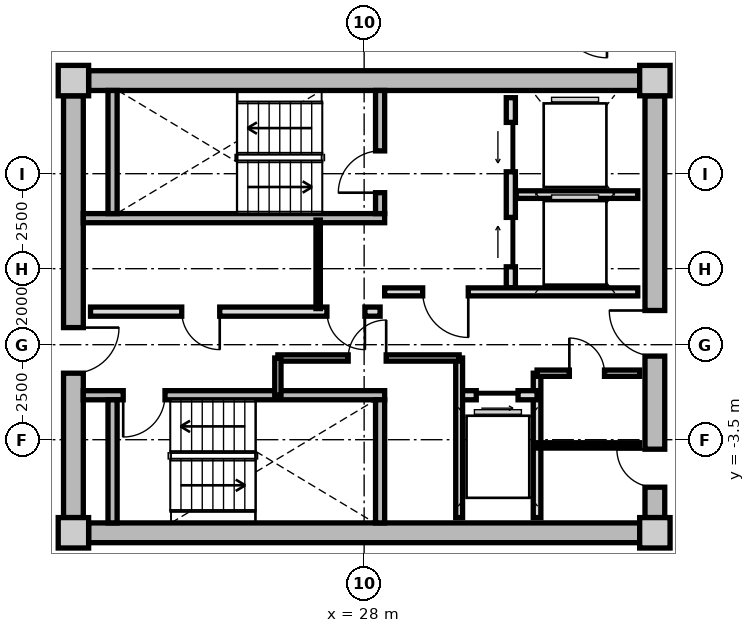
"""IFC4 building model, lengths in metres.
Left out: names, types, materials, properties, quantities, classifications, styles, units other than length and angle.
Written with IfcOpenShell. Run it as: python <this file> out.ifc"""

import sys

from ifc_helpers import new_model, si_unit, direction, frame, frame_2d, origin, origin_2d, place, context, subcontext, project, spatial, rectangle, extrude, source, transform, mapped, element, fill, save


model = new_model("IFC4")
c1 = context("Model", 3, precision=1e-05, world=origin(), true_north=direction((0.0, 1.0)))
c2 = subcontext(c1, "Body", "Model", "MODEL_VIEW")
j1 = project(units=[si_unit("LENGTHUNIT", "METRE"), si_unit("PLANEANGLEUNIT", "RADIAN")], contexts=[c1])
p1 = place(None, origin())
s1 = spatial("IfcSite", under=j1, at=p1, CompositionType="ELEMENT")
p2 = place(p1, origin())
s2 = spatial("IfcBuilding", under=s1, at=p2, CompositionType="ELEMENT")
p3 = place(p2, frame((0.0, 0.0, 190.65)))
s3 = spatial("IfcBuildingStorey", under=s2, at=p3, CompositionType="ELEMENT", Elevation=190.65)
m1 = source(origin(), c2, "Body", "SweptSolid", [
    extrude(rectangle(XDim=0.8, YDim=0.8, at=origin_2d()), origin(), (0.0, 0.0, 1.0), 3.05),
])
for number, where, z_axis, x_axis in (
    (1, (20.35, -5.95, 0.0), (0.0, 0.0, 1.0), (1.0, 0.0, 0.0)),
    (2, (35.65, -5.95, 0.0), (0.0, 0.0, 1.0), (1.0, 0.0, 0.0)),
    (3, (35.65, 5.95, 0.0), (0.0, 0.0, 1.0), (1.0, 0.0, 0.0)),
    (4, (20.35, 5.95, 0.0), (0.0, 0.0, 1.0), (1.0, 0.0, 0.0)),
):
    element("IfcColumn", number, at=place(p3, frame(where, z_axis=z_axis, x_axis=x_axis)), inside=s3, PredefinedType="COLUMN", context=c2, shape_type="MappedRepresentation", body=[
        mapped(m1, transform((0.0, 0.0, 0.0), x_axis=(1.0, 0.0, 0.0), y_axis=(0.0, 1.0, 0.0), z_axis=(0.0, 0.0, 1.0), scale=1.0)),
    ])
m2 = source(origin(), c2, "Body", "SweptSolid", [
    extrude(rectangle(XDim=14.5, YDim=0.52, at=frame_2d((7.25, 0.0))), origin(), (0.0, 0.0, 1.0), 2.81),
])
for number, where, z_axis, x_axis in (
    (5, (20.75, 5.95, 0.0), (0.0, 0.0, 1.0), (1.0, 0.0, 0.0)),
    (6, (35.25, -5.95, 0.0), (0.0, 0.0, 1.0), (-1.0, 0.0, 0.0)),
):
    element("IfcWall", number, at=place(p3, frame(where, z_axis=z_axis, x_axis=x_axis)), inside=s3, PredefinedType="SHEAR", context=c2, shape_type="MappedRepresentation", body=[
        mapped(m2, transform((0.0, 0.0, 0.0), x_axis=(1.0, 0.0, 0.0), y_axis=(0.0, 1.0, 0.0), z_axis=(0.0, 0.0, 1.0), scale=1.0)),
    ])
m3 = source(origin(), c2, "Body", "SweptSolid", [
    extrude(rectangle(XDim=11.1, YDim=0.52, at=frame_2d((5.55, 0.0))), origin(), (0.0, 0.0, 1.0), 2.81),
])
p4 = place(p3, frame((20.35, -5.55, 0.0), z_axis=(0.0, 0.0, 1.0), x_axis=(0.0, 1.0, 0.0)))
e7 = element("IfcWall", 7, at=p4, inside=s3, PredefinedType="SHEAR", context=c2, shape_type="MappedRepresentation", body=[
    mapped(m3, transform((0.0, 0.0, 0.0), x_axis=(1.0, 0.0, 0.0), y_axis=(0.0, 1.0, 0.0), z_axis=(0.0, 0.0, 1.0), scale=1.0)),
])
p5 = place(p4, frame((3.8, 0.0, 0.0)))
e8 = element("IfcOpeningElement", 8, at=p5, cuts=e7, PredefinedType="OPENING", context=c2, shape_type="SweptSolid", body=[
    extrude(rectangle(XDim=1.2, YDim=2.15, at=frame_2d((0.6, 1.075))), frame((0.0, 0.27, 0.0), z_axis=(0.0, -1.0, 0.0), x_axis=(1.0, 0.0, 0.0)), (0.0, 0.0, 1.0), 0.54),
])
p6 = place(p3, frame((35.65, 5.55, 0.0), z_axis=(0.0, 0.0, 1.0), x_axis=(0.0, -1.0, 0.0)))
e9 = element("IfcWall", 9, at=p6, inside=s3, PredefinedType="SHEAR", context=c2, shape_type="MappedRepresentation", body=[
    mapped(m3, transform((0.0, 0.0, 0.0), x_axis=(1.0, 0.0, 0.0), y_axis=(0.0, 1.0, 0.0), z_axis=(0.0, 0.0, 1.0), scale=1.0)),
])
p7 = place(p6, frame((5.65, 0.0, 0.0)))
e10 = element("IfcOpeningElement", 10, at=p7, cuts=e9, PredefinedType="OPENING", context=c2, shape_type="SweptSolid", body=[
    extrude(rectangle(XDim=1.2, YDim=2.15, at=frame_2d((0.6, 1.075))), frame((0.0, 0.27, 0.0), z_axis=(0.0, -1.0, 0.0), x_axis=(1.0, 0.0, 0.0)), (0.0, 0.0, 1.0), 0.54),
])
p8 = place(p6, frame((9.3, 0.0, 0.0)))
e11 = element("IfcOpeningElement", 11, at=p8, cuts=e9, PredefinedType="OPENING", context=c2, shape_type="SweptSolid", body=[
    extrude(rectangle(XDim=1.0, YDim=2.1, at=frame_2d((0.5, 1.05))), frame((0.0, 0.27, 0.0), z_axis=(0.0, -1.0, 0.0), x_axis=(1.0, 0.0, 0.0)), (0.0, 0.0, 1.0), 0.54),
])
m4 = source(origin(), c2, "Body", "SweptSolid", [
    extrude(rectangle(XDim=7.93, YDim=0.24, at=frame_2d((3.965, 0.0))), origin(), (0.0, 0.0, 1.0), 2.81),
])
p9 = place(p3, frame((20.61, 2.33, 0.0), z_axis=(0.0, 0.0, 1.0), x_axis=(1.0, 0.0, 0.0)))
e12 = element("IfcWall", 12, at=p9, inside=s3, PredefinedType="PARTITIONING", context=c2, shape_type="MappedRepresentation", body=[
    mapped(m4, transform((0.0, 0.0, 0.0), x_axis=(1.0, 0.0, 0.0), y_axis=(0.0, 1.0, 0.0), z_axis=(0.0, 0.0, 1.0), scale=1.0)),
])
m5 = source(origin(), c2, "Body", "SweptSolid", [
    extrude(rectangle(XDim=3.24, YDim=0.24, at=frame_2d((1.62, 0.0))), origin(), (0.0, 0.0, 1.0), 2.81),
])
p10 = place(p3, frame((21.38, 2.45, 0.0), z_axis=(0.0, 0.0, 1.0), x_axis=(0.0, 1.0, 0.0)))
e13 = element("IfcWall", 13, at=p10, inside=s3, PredefinedType="PARTITIONING", context=c2, shape_type="MappedRepresentation", body=[
    mapped(m5, transform((0.0, 0.0, 0.0), x_axis=(1.0, 0.0, 0.0), y_axis=(0.0, 1.0, 0.0), z_axis=(0.0, 0.0, 1.0), scale=1.0)),
])
p11 = place(p3, frame((28.42, 2.45, 0.0), z_axis=(0.0, 0.0, 1.0), x_axis=(0.0, 1.0, 0.0)))
e14 = element("IfcWall", 14, at=p11, inside=s3, PredefinedType="PARTITIONING", context=c2, shape_type="MappedRepresentation", body=[
    mapped(m5, transform((0.0, 0.0, 0.0), x_axis=(1.0, 0.0, 0.0), y_axis=(0.0, 1.0, 0.0), z_axis=(0.0, 0.0, 1.0), scale=1.0)),
])
p12 = place(p11, frame((0.55, 0.0, 0.0)))
e15 = element("IfcOpeningElement", 15, at=p12, cuts=e14, PredefinedType="OPENING", context=c2, shape_type="SweptSolid", body=[
    extrude(rectangle(XDim=1.1, YDim=2.15, at=frame_2d((0.55, 1.075))), frame((0.0, 0.13, 0.0), z_axis=(0.0, -1.0, 0.0), x_axis=(1.0, 0.0, 0.0)), (0.0, 0.0, 1.0), 0.26),
])
p13 = place(p3, frame((20.61, -2.33, 0.0), z_axis=(0.0, 0.0, 1.0), x_axis=(1.0, 0.0, 0.0)))
e16 = element("IfcWall", 16, at=p13, inside=s3, PredefinedType="PARTITIONING", context=c2, shape_type="MappedRepresentation", body=[
    mapped(m4, transform((0.0, 0.0, 0.0), x_axis=(1.0, 0.0, 0.0), y_axis=(0.0, 1.0, 0.0), z_axis=(0.0, 0.0, 1.0), scale=1.0)),
])
p14 = place(p13, frame((1.05, 0.0, 0.0)))
e17 = element("IfcOpeningElement", 17, at=p14, cuts=e16, PredefinedType="OPENING", context=c2, shape_type="SweptSolid", body=[
    extrude(rectangle(XDim=1.1, YDim=2.15, at=frame_2d((0.55, 1.075))), frame((0.0, 0.13, 0.0), z_axis=(0.0, -1.0, 0.0), x_axis=(1.0, 0.0, 0.0)), (0.0, 0.0, 1.0), 0.26),
])
for number, where, z_axis, x_axis in (
    (18, (21.38, -5.69, 0.0), (0.0, 0.0, 1.0), (0.0, 1.0, 0.0)),
    (19, (28.42, -5.69, 0.0), (0.0, 0.0, 1.0), (0.0, 1.0, 0.0)),
):
    element("IfcWall", number, at=place(p3, frame(where, z_axis=z_axis, x_axis=x_axis)), inside=s3, PredefinedType="PARTITIONING", context=c2, shape_type="MappedRepresentation", body=[
        mapped(m5, transform((0.0, 0.0, 0.0), x_axis=(1.0, 0.0, 0.0), y_axis=(0.0, 1.0, 0.0), z_axis=(0.0, 0.0, 1.0), scale=1.0)),
    ])
m6 = source(origin(), c2, "Body", "SweptSolid", [
    extrude(rectangle(XDim=5.0, YDim=0.24, at=frame_2d((2.5, 0.0))), origin(), (0.0, 0.0, 1.0), 2.795),
])
p15 = place(p3, frame((31.86, 0.5, 0.0), z_axis=(0.0, 0.0, 1.0), x_axis=(0.0, 1.0, 0.0)))
e20 = element("IfcWall", 20, at=p15, inside=s3, PredefinedType="PARTITIONING", context=c2, shape_type="MappedRepresentation", body=[
    mapped(m6, transform((0.0, 0.0, 0.0), x_axis=(1.0, 0.0, 0.0), y_axis=(0.0, 1.0, 0.0), z_axis=(0.0, 0.0, 1.0), scale=1.0)),
])
p16 = place(p15, frame((3.05, 0.0, 0.0)))
e21 = element("IfcOpeningElement", 21, at=p16, cuts=e20, PredefinedType="OPENING", context=c2, shape_type="SweptSolid", body=[
    extrude(rectangle(XDim=1.3, YDim=2.2, at=frame_2d((0.65, 1.1))), frame((0.0, 0.13, 0.0), z_axis=(0.0, -1.0, 0.0), x_axis=(1.0, 0.0, 0.0)), (0.0, 0.0, 1.0), 0.26),
])
p17 = place(p15, frame((0.55, 0.0, 0.0)))
e22 = element("IfcOpeningElement", 22, at=p17, cuts=e20, PredefinedType="OPENING", context=c2, shape_type="SweptSolid", body=[
    extrude(rectangle(XDim=1.3, YDim=2.2, at=frame_2d((0.65, 1.1))), frame((0.0, 0.13, 0.0), z_axis=(0.0, -1.0, 0.0), x_axis=(1.0, 0.0, 0.0)), (0.0, 0.0, 1.0), 0.26),
])
m7 = source(origin(), c2, "Body", "SweptSolid", [
    extrude(rectangle(XDim=3.2, YDim=0.2, at=frame_2d((1.6, 0.0))), origin(), (0.0, 0.0, 1.0), 2.795),
])
p18 = place(p3, frame((32.0, 2.95, 0.0), z_axis=(0.0, 0.0, 1.0), x_axis=(1.0, 0.0, 0.0)))
e23 = element("IfcWall", 23, at=p18, inside=s3, PredefinedType="PARTITIONING", context=c2, shape_type="MappedRepresentation", body=[
    mapped(m7, transform((0.0, 0.0, 0.0), x_axis=(1.0, 0.0, 0.0), y_axis=(0.0, 1.0, 0.0), z_axis=(0.0, 0.0, 1.0), scale=1.0)),
])
m8 = source(origin(), c2, "Body", "SweptSolid", [
    extrude(rectangle(XDim=6.66, YDim=0.21, at=frame_2d((3.33, 0.0))), origin(), (0.0, 0.0, 1.0), 2.795),
])
p19 = place(p3, frame((28.54, 0.39, 0.0), z_axis=(0.0, 0.0, 1.0), x_axis=(1.0, 0.0, 0.0)))
e24 = element("IfcWall", 24, at=p19, inside=s3, PredefinedType="PARTITIONING", context=c2, shape_type="MappedRepresentation", body=[
    mapped(m8, transform((0.0, 0.0, 0.0), x_axis=(1.0, 0.0, 0.0), y_axis=(0.0, 1.0, 0.0), z_axis=(0.0, 0.0, 1.0), scale=1.0)),
])
p20 = place(p19, frame((1.0, 0.0, 0.0)))
e25 = element("IfcOpeningElement", 25, at=p20, cuts=e24, PredefinedType="OPENING", context=c2, shape_type="SweptSolid", body=[
    extrude(rectangle(XDim=1.2, YDim=2.15, at=frame_2d((0.6, 1.075))), frame((0.0, 0.115, 0.0), z_axis=(0.0, -1.0, 0.0), x_axis=(1.0, 0.0, 0.0)), (0.0, 0.0, 1.0), 0.23),
])
m9 = source(origin(), c2, "Body", "SweptSolid", [
    extrude(rectangle(XDim=7.62, YDim=0.24, at=frame_2d((3.81, 0.0))), origin(), (0.0, 0.0, 1.0), 2.795),
])
p21 = place(p3, frame((20.8, -0.13, 0.0), z_axis=(0.0, 0.0, 1.0), x_axis=(1.0, 0.0, 0.0)))
e26 = element("IfcWall", 26, at=p21, inside=s3, PredefinedType="PARTITIONING", context=c2, shape_type="MappedRepresentation", body=[
    mapped(m9, transform((0.0, 0.0, 0.0), x_axis=(1.0, 0.0, 0.0), y_axis=(0.0, 1.0, 0.0), z_axis=(0.0, 0.0, 1.0), scale=1.0)),
])
p22 = place(p21, frame((6.22, 0.0, 0.0)))
e27 = element("IfcOpeningElement", 27, at=p22, cuts=e26, PredefinedType="OPENING", context=c2, shape_type="SweptSolid", body=[
    extrude(rectangle(XDim=1.0, YDim=2.1, at=frame_2d((0.5, 1.05))), frame((0.0, 0.13, 0.0), z_axis=(0.0, -1.0, 0.0), x_axis=(1.0, 0.0, 0.0)), (0.0, 0.0, 1.0), 0.26),
])
p23 = place(p21, frame((2.4, 0.0, 0.0)))
e28 = element("IfcOpeningElement", 28, at=p23, cuts=e26, PredefinedType="OPENING", context=c2, shape_type="SweptSolid", body=[
    extrude(rectangle(XDim=1.0, YDim=2.1, at=frame_2d((0.5, 1.05))), frame((0.0, 0.13, 0.0), z_axis=(0.0, -1.0, 0.0), x_axis=(1.0, 0.0, 0.0)), (0.0, 0.0, 1.0), 0.26),
])
m10 = source(origin(), c2, "Body", "SweptSolid", [
    extrude(rectangle(XDim=2.33, YDim=0.115, at=frame_2d((1.165, 0.0))), origin(), (0.0, 0.0, 1.0), 2.795),
])
p24 = place(p3, frame((26.79, -0.05, 0.0), z_axis=(0.0, 0.0, 1.0), x_axis=(0.0, 1.0, 0.0)))
e29 = element("IfcWall", 29, at=p24, inside=s3, PredefinedType="PARTITIONING", context=c2, shape_type="MappedRepresentation", body=[
    mapped(m10, transform((0.0, 0.0, 0.0), x_axis=(1.0, 0.0, 0.0), y_axis=(0.0, 1.0, 0.0), z_axis=(0.0, 0.0, 1.0), scale=1.0)),
])
m11 = source(origin(), c2, "Body", "SweptSolid", [
    extrude(rectangle(XDim=3.8, YDim=0.2, at=frame_2d((1.9, 0.0))), origin(), (0.0, 0.0, 1.0), 2.795),
])
p25 = place(p3, frame((32.55, -5.55, 0.0), z_axis=(0.0, 0.0, 1.0), x_axis=(0.0, 1.0, 0.0)))
e30 = element("IfcWall", 30, at=p25, inside=s3, PredefinedType="PARTITIONING", context=c2, shape_type="MappedRepresentation", body=[
    mapped(m11, transform((0.0, 0.0, 0.0), x_axis=(1.0, 0.0, 0.0), y_axis=(0.0, 1.0, 0.0), z_axis=(0.0, 0.0, 1.0), scale=1.0)),
])
m12 = source(origin(), c2, "Body", "SweptSolid", [
    extrude(rectangle(XDim=2.05, YDim=0.24, at=frame_2d((1.025, 0.0))), origin(), (0.0, 0.0, 1.0), 2.795),
])
p26 = place(p3, frame((30.5, -2.33, 0.0), z_axis=(0.0, 0.0, 1.0), x_axis=(1.0, 0.0, 0.0)))
e31 = element("IfcWall", 31, at=p26, inside=s3, PredefinedType="PARTITIONING", context=c2, shape_type="MappedRepresentation", body=[
    mapped(m12, transform((0.0, 0.0, 0.0), x_axis=(1.0, 0.0, 0.0), y_axis=(0.0, 1.0, 0.0), z_axis=(0.0, 0.0, 1.0), scale=1.0)),
])
p27 = place(p26, frame((0.45, 0.0, 0.0)))
e32 = element("IfcOpeningElement", 32, at=p27, cuts=e31, PredefinedType="OPENING", context=c2, shape_type="SweptSolid", body=[
    extrude(rectangle(XDim=1.1, YDim=2.2, at=frame_2d((0.55, 1.1))), frame((0.0, 0.13, 0.0), z_axis=(0.0, -1.0, 0.0), x_axis=(1.0, 0.0, 0.0)), (0.0, 0.0, 1.0), 0.26),
])
m13 = source(origin(), c2, "Body", "SweptSolid", [
    extrude(rectangle(XDim=4.2, YDim=0.18, at=frame_2d((2.1, 0.0))), origin(), (0.0, 0.0, 1.0), 2.795),
])
p28 = place(p3, frame((30.5, -5.55, 0.0), z_axis=(0.0, 0.0, 1.0), x_axis=(0.0, 1.0, 0.0)))
e33 = element("IfcWall", 33, at=p28, inside=s3, PredefinedType="PARTITIONING", context=c2, shape_type="MappedRepresentation", body=[
    mapped(m13, transform((0.0, 0.0, 0.0), x_axis=(1.0, 0.0, 0.0), y_axis=(0.0, 1.0, 0.0), z_axis=(0.0, 0.0, 1.0), scale=1.0)),
])
m14 = source(origin(), c2, "Body", "SweptSolid", [
    extrude(rectangle(XDim=4.77, YDim=0.165, at=frame_2d((2.385, 0.0))), origin(), (0.0, 0.0, 1.0), 2.795),
])
p29 = place(p3, frame((25.73, -1.35, 0.0), z_axis=(0.0, 0.0, 1.0), x_axis=(1.0, 0.0, 0.0)))
e34 = element("IfcWall", 34, at=p29, inside=s3, PredefinedType="PARTITIONING", context=c2, shape_type="MappedRepresentation", body=[
    mapped(m14, transform((0.0, 0.0, 0.0), x_axis=(1.0, 0.0, 0.0), y_axis=(0.0, 1.0, 0.0), z_axis=(0.0, 0.0, 1.0), scale=1.0)),
])
p30 = place(p29, frame((1.85, 0.0, 0.0)))
e35 = element("IfcOpeningElement", 35, at=p30, cuts=e34, PredefinedType="OPENING", context=c2, shape_type="SweptSolid", body=[
    extrude(rectangle(XDim=1.0, YDim=2.1, at=frame_2d((0.5, 1.05))), frame((0.0, 0.093, 0.0), z_axis=(0.0, -1.0, 0.0), x_axis=(1.0, 0.0, 0.0)), (0.0, 0.0, 1.0), 0.185),
])
m15 = source(origin(), c2, "Body", "SweptSolid", [
    extrude(rectangle(XDim=0.98, YDim=0.165, at=frame_2d((0.49, 0.0))), origin(), (0.0, 0.0, 1.0), 2.795),
])
p31 = place(p3, frame((25.73, -2.33, 0.0), z_axis=(0.0, 0.0, 1.0), x_axis=(0.0, 1.0, 0.0)))
e36 = element("IfcWall", 36, at=p31, inside=s3, PredefinedType="PARTITIONING", context=c2, shape_type="MappedRepresentation", body=[
    mapped(m15, transform((0.0, 0.0, 0.0), x_axis=(1.0, 0.0, 0.0), y_axis=(0.0, 1.0, 0.0), z_axis=(0.0, 0.0, 1.0), scale=1.0)),
])
m16 = source(origin(), c2, "Body", "SweptSolid", [
    extrude(rectangle(XDim=2.7, YDim=0.165, at=frame_2d((1.35, 0.0))), origin(), (0.0, 0.0, 1.0), 2.795),
])
p32 = place(p3, frame((32.55, -1.75, 0.0), z_axis=(0.0, 0.0, 1.0), x_axis=(1.0, 0.0, 0.0)))
e37 = element("IfcWall", 37, at=p32, inside=s3, PredefinedType="PARTITIONING", context=c2, shape_type="MappedRepresentation", body=[
    mapped(m16, transform((0.0, 0.0, 0.0), x_axis=(1.0, 0.0, 0.0), y_axis=(0.0, 1.0, 0.0), z_axis=(0.0, 0.0, 1.0), scale=1.0)),
])
p33 = place(p32, frame((0.85, 0.0, 0.0)))
e38 = element("IfcOpeningElement", 38, at=p33, cuts=e37, PredefinedType="OPENING", context=c2, shape_type="SweptSolid", body=[
    extrude(rectangle(XDim=0.925, YDim=2.1, at=frame_2d((0.462, 1.05))), frame((0.0, 0.093, 0.0), z_axis=(0.0, -1.0, 0.0), x_axis=(1.0, 0.0, 0.0)), (0.0, 0.0, 1.0), 0.185),
])
m17 = source(origin(), c2, "Body", "SweptSolid", [
    extrude(rectangle(XDim=2.7, YDim=0.14, at=frame_2d((1.35, 0.0))), origin(), (0.0, 0.0, 1.0), 2.795),
])
p34 = place(p3, frame((32.55, -3.65, 0.0), z_axis=(0.0, 0.0, 1.0), x_axis=(1.0, 0.0, 0.0)))
e39 = element("IfcWall", 39, at=p34, inside=s3, PredefinedType="PARTITIONING", context=c2, shape_type="MappedRepresentation", body=[
    mapped(m17, transform((0.0, 0.0, 0.0), x_axis=(1.0, 0.0, 0.0), y_axis=(0.0, 1.0, 0.0), z_axis=(0.0, 0.0, 1.0), scale=1.0)),
])
m18 = source(origin(), c2, "Body", "SweptSolid", [
    extrude(rectangle(XDim=1.1, YDim=2.15, at=frame_2d((0.55, 1.075))), frame((0.0, 0.025, 0.0), z_axis=(0.0, -1.0, 0.0), x_axis=(1.0, 0.0, 0.0)), (0.0, 0.0, 1.0), 0.05),
])
p35 = place(p12, origin())
e40 = element("IfcDoor", 40, at=p35, inside=s3, OperationType="SINGLE_SWING_LEFT", PredefinedType="DOOR", context=c2, shape_type="MappedRepresentation", body=[
    mapped(m18, transform((0.0, 0.0, 0.0), x_axis=(1.0, 0.0, 0.0), y_axis=(0.0, 1.0, 0.0), z_axis=(0.0, 0.0, 1.0), scale=1.0)),
])
fill(e15, e40)
p36 = place(p14, frame((1.1, 0.0, 0.0), z_axis=(0.0, 0.0, 1.0), x_axis=(-1.0, 0.0, 0.0)))
e41 = element("IfcDoor", 41, at=p36, inside=s3, OperationType="SINGLE_SWING_RIGHT", PredefinedType="DOOR", context=c2, shape_type="MappedRepresentation", body=[
    mapped(m18, transform((0.0, 0.0, 0.0), x_axis=(1.0, 0.0, 0.0), y_axis=(0.0, 1.0, 0.0), z_axis=(0.0, 0.0, 1.0), scale=1.0)),
])
fill(e17, e41)
m19 = source(origin(), c2, "Body", "SweptSolid", [
    extrude(rectangle(XDim=1.3, YDim=2.2, at=frame_2d((0.65, 1.1))), frame((0.0, 0.025, 0.0), z_axis=(0.0, -1.0, 0.0), x_axis=(1.0, 0.0, 0.0)), (0.0, 0.0, 1.0), 0.05),
])
p37 = place(p16, origin())
e42 = element("IfcDoor", 42, at=p37, inside=s3, OperationType="SLIDING_TO_LEFT", PredefinedType="DOOR", context=c2, shape_type="MappedRepresentation", body=[
    mapped(m19, transform((0.0, 0.0, 0.0), x_axis=(1.0, 0.0, 0.0), y_axis=(0.0, 1.0, 0.0), z_axis=(0.0, 0.0, 1.0), scale=1.0)),
])
fill(e21, e42)
p38 = place(p17, origin())
e43 = element("IfcDoor", 43, at=p38, inside=s3, OperationType="SLIDING_TO_RIGHT", PredefinedType="DOOR", context=c2, shape_type="MappedRepresentation", body=[
    mapped(m19, transform((0.0, 0.0, 0.0), x_axis=(1.0, 0.0, 0.0), y_axis=(0.0, 1.0, 0.0), z_axis=(0.0, 0.0, 1.0), scale=1.0)),
])
fill(e22, e43)
m20 = source(origin(), c2, "Body", "SweptSolid", [
    extrude(rectangle(XDim=1.2, YDim=2.15, at=frame_2d((0.6, 1.075))), frame((0.0, 0.025, 0.0), z_axis=(0.0, -1.0, 0.0), x_axis=(1.0, 0.0, 0.0)), (0.0, 0.0, 1.0), 0.05),
])
p39 = place(p20, frame((1.2, 0.0, 0.0), z_axis=(0.0, 0.0, 1.0), x_axis=(-1.0, 0.0, 0.0)))
e44 = element("IfcDoor", 44, at=p39, inside=s3, OperationType="SINGLE_SWING_LEFT", PredefinedType="DOOR", context=c2, shape_type="MappedRepresentation", body=[
    mapped(m20, transform((0.0, 0.0, 0.0), x_axis=(1.0, 0.0, 0.0), y_axis=(0.0, 1.0, 0.0), z_axis=(0.0, 0.0, 1.0), scale=1.0)),
])
fill(e25, e44)
p40 = place(p5, frame((1.2, 0.0, 0.0), z_axis=(0.0, 0.0, 1.0), x_axis=(-1.0, 0.0, 0.0)))
e45 = element("IfcDoor", 45, at=p40, inside=s3, OperationType="SINGLE_SWING_LEFT", PredefinedType="DOOR", context=c2, shape_type="MappedRepresentation", body=[
    mapped(m20, transform((0.0, 0.0, 0.0), x_axis=(1.0, 0.0, 0.0), y_axis=(0.0, 1.0, 0.0), z_axis=(0.0, 0.0, 1.0), scale=1.0)),
])
fill(e8, e45)
p41 = place(p7, frame((1.2, 0.0, 0.0), z_axis=(0.0, 0.0, 1.0), x_axis=(-1.0, 0.0, 0.0)))
e46 = element("IfcDoor", 46, at=p41, inside=s3, OperationType="SINGLE_SWING_RIGHT", PredefinedType="DOOR", context=c2, shape_type="MappedRepresentation", body=[
    mapped(m20, transform((0.0, 0.0, 0.0), x_axis=(1.0, 0.0, 0.0), y_axis=(0.0, 1.0, 0.0), z_axis=(0.0, 0.0, 1.0), scale=1.0)),
])
fill(e10, e46)
m21 = source(origin(), c2, "Body", "SweptSolid", [
    extrude(rectangle(XDim=1.0, YDim=2.1, at=frame_2d((0.5, 1.05))), frame((0.0, 0.025, 0.0), z_axis=(0.0, -1.0, 0.0), x_axis=(1.0, 0.0, 0.0)), (0.0, 0.0, 1.0), 0.05),
])
p42 = place(p22, frame((1.0, 0.0, 0.0), z_axis=(0.0, 0.0, 1.0), x_axis=(-1.0, 0.0, 0.0)))
e47 = element("IfcDoor", 47, at=p42, inside=s3, OperationType="SINGLE_SWING_LEFT", PredefinedType="DOOR", context=c2, shape_type="MappedRepresentation", body=[
    mapped(m21, transform((0.0, 0.0, 0.0), x_axis=(1.0, 0.0, 0.0), y_axis=(0.0, 1.0, 0.0), z_axis=(0.0, 0.0, 1.0), scale=1.0)),
])
fill(e27, e47)
p43 = place(p23, frame((1.0, 0.0, 0.0), z_axis=(0.0, 0.0, 1.0), x_axis=(-1.0, 0.0, 0.0)))
e48 = element("IfcDoor", 48, at=p43, inside=s3, OperationType="SINGLE_SWING_LEFT", PredefinedType="DOOR", context=c2, shape_type="MappedRepresentation", body=[
    mapped(m21, transform((0.0, 0.0, 0.0), x_axis=(1.0, 0.0, 0.0), y_axis=(0.0, 1.0, 0.0), z_axis=(0.0, 0.0, 1.0), scale=1.0)),
])
fill(e28, e48)
m22 = source(origin(), c2, "Body", "SweptSolid", [
    extrude(rectangle(XDim=1.1, YDim=2.2, at=frame_2d((0.55, 1.1))), frame((0.0, 0.025, 0.0), z_axis=(0.0, -1.0, 0.0), x_axis=(1.0, 0.0, 0.0)), (0.0, 0.0, 1.0), 0.05),
])
p44 = place(p27, frame((1.1, 0.0, 0.0), z_axis=(0.0, 0.0, 1.0), x_axis=(-1.0, 0.0, 0.0)))
e49 = element("IfcDoor", 49, at=p44, inside=s3, OperationType="SLIDING_TO_RIGHT", PredefinedType="DOOR", context=c2, shape_type="MappedRepresentation", body=[
    mapped(m22, transform((0.0, 0.0, 0.0), x_axis=(1.0, 0.0, 0.0), y_axis=(0.0, 1.0, 0.0), z_axis=(0.0, 0.0, 1.0), scale=1.0)),
])
fill(e32, e49)
p45 = place(p30, origin())
e50 = element("IfcDoor", 50, at=p45, inside=s3, OperationType="SINGLE_SWING_RIGHT", PredefinedType="DOOR", context=c2, shape_type="MappedRepresentation", body=[
    mapped(m21, transform((0.0, 0.0, 0.0), x_axis=(1.0, 0.0, 0.0), y_axis=(0.0, 1.0, 0.0), z_axis=(0.0, 0.0, 1.0), scale=1.0)),
])
fill(e35, e50)
m23 = source(origin(), c2, "Body", "SweptSolid", [
    extrude(rectangle(XDim=0.925, YDim=2.1, at=frame_2d((0.462, 1.05))), frame((0.0, 0.025, 0.0), z_axis=(0.0, -1.0, 0.0), x_axis=(1.0, 0.0, 0.0)), (0.0, 0.0, 1.0), 0.05),
])
p46 = place(p33, origin())
e51 = element("IfcDoor", 51, at=p46, inside=s3, OperationType="SINGLE_SWING_LEFT", PredefinedType="DOOR", context=c2, shape_type="MappedRepresentation", body=[
    mapped(m23, transform((0.0, 0.0, 0.0), x_axis=(1.0, 0.0, 0.0), y_axis=(0.0, 1.0, 0.0), z_axis=(0.0, 0.0, 1.0), scale=1.0)),
])
fill(e38, e51)
p47 = place(p8, frame((1.0, 0.0, 0.0), z_axis=(0.0, 0.0, 1.0), x_axis=(-1.0, 0.0, 0.0)))
e52 = element("IfcDoor", 52, at=p47, inside=s3, OperationType="SINGLE_SWING_RIGHT", PredefinedType="DOOR", context=c2, shape_type="MappedRepresentation", body=[
    mapped(m21, transform((0.0, 0.0, 0.0), x_axis=(1.0, 0.0, 0.0), y_axis=(0.0, 1.0, 0.0), z_axis=(0.0, 0.0, 1.0), scale=1.0)),
])
fill(e11, e52)
save(model, sys.argv[1])
